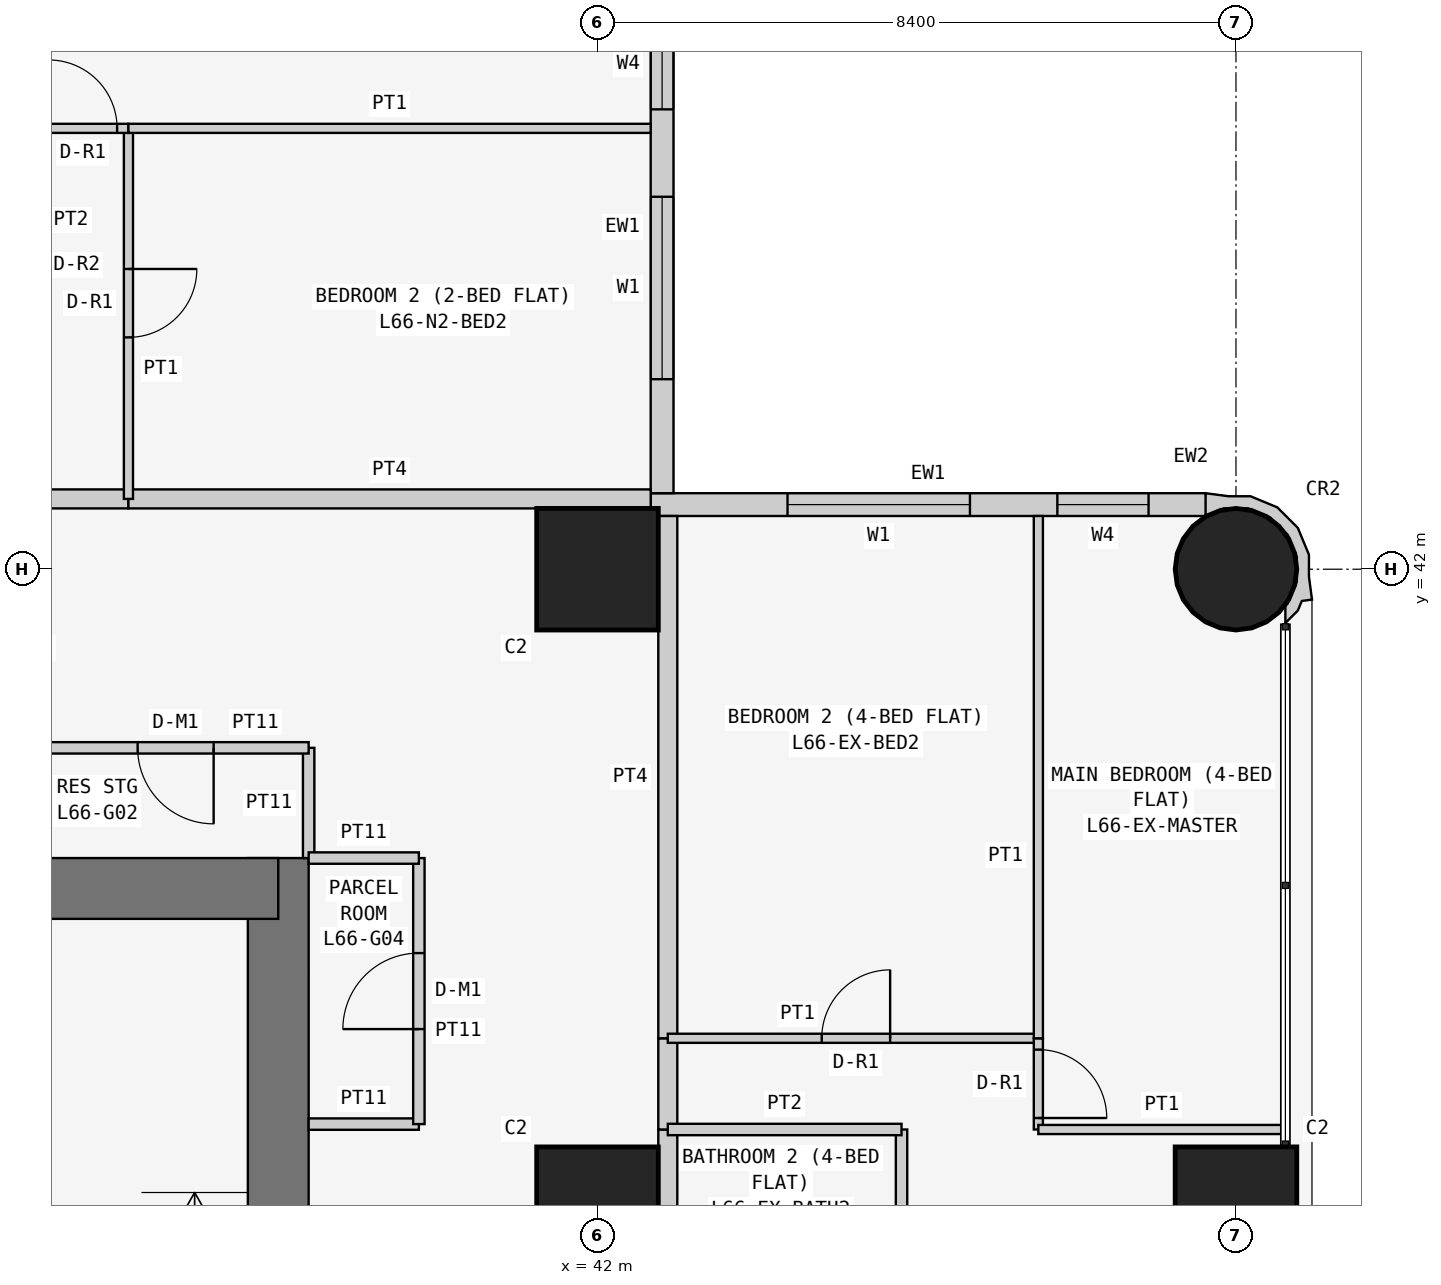
"""IFC4 building model, lengths in metres.
Left out: names, types, materials, properties, quantities, classifications, styles, units other than length and angle.
Written with IfcOpenShell. Run it as: python <this file> out.ifc"""

import sys

from ifc_helpers import new_model, si_unit, direction, frame, frame_2d, origin, origin_2d, place, context, subcontext, project, spatial, polyline, rectangle, circle, outline, extrude, element, fill, save


model = new_model("IFC4")
c1 = context("Model", 3, precision=1e-05, world=origin(), true_north=direction((0.0, 1.0)))
c2 = subcontext(c1, "Body", "Model", "MODEL_VIEW")
j1 = project(units=[si_unit("LENGTHUNIT", "METRE"), si_unit("PLANEANGLEUNIT", "RADIAN")], contexts=[c1])
p1 = place(None, origin())
s1 = spatial("IfcSite", under=j1, at=p1, CompositionType="ELEMENT")
p2 = place(p1, origin())
s2 = spatial("IfcBuilding", under=s1, at=p2, CompositionType="ELEMENT")
p3 = place(p2, frame((0.0, 0.0, 254.1)))
s3 = spatial("IfcBuildingStorey", under=s2, at=p3, CompositionType="ELEMENT", Elevation=254.1)
for number, where, z_axis, x_axis in (
    (1, (42.0, 33.6, 0.0), (0.0, 0.0, 1.0), (1.0, 0.0, 0.0)),
    (2, (42.0, 42.0, 0.0), (0.0, 0.0, 1.0), (1.0, 0.0, 0.0)),
    (3, (50.4, 33.6, 0.0), (0.0, 0.0, 1.0), (1.0, 0.0, 0.0)),
):
    element("IfcColumn", number, at=place(p3, frame(where, z_axis=z_axis, x_axis=x_axis)), inside=s3, PredefinedType="COLUMN", context=c2, shape_type="SweptSolid", body=[
        extrude(rectangle(XDim=1.6, YDim=1.6, at=origin_2d()), origin(), (0.0, 0.0, 1.0), 3.6),
    ])
p4 = place(p3, frame((50.4, 42.0, 0.0), z_axis=(0.0, 0.0, 1.0), x_axis=(1.0, 0.0, 0.0)))
e4 = element("IfcColumn", 4, at=p4, inside=s3, PredefinedType="COLUMN", context=c2, shape_type="SweptSolid", body=[
    extrude(circle(Radius=0.8, at=origin_2d()), origin(), (0.0, 0.0, 1.0), 3.6),
])
p5 = place(p3, frame((37.8, 21.0, 0.0), z_axis=(0.0, 0.0, 1.0), x_axis=(0.0, 1.0, 0.0)))
e5 = element("IfcWall", 5, at=p5, inside=s3, PredefinedType="SHEAR", context=c2, shape_type="SweptSolid", body=[
    extrude(rectangle(XDim=17.2, YDim=0.8, at=frame_2d((8.6, 0.0))), origin(), (0.0, 0.0, 1.0), 3.6),
])
p6 = place(p5, frame((5.2, 0.0, 0.0)))
e6 = element("IfcOpeningElement", 6, at=p6, cuts=e5, PredefinedType="OPENING", context=c2, shape_type="SweptSolid", body=[
    extrude(rectangle(XDim=1.2, YDim=2.1, at=frame_2d((0.6, 1.05))), frame((0.0, 0.41, 0.0), z_axis=(0.0, -1.0, 0.0), x_axis=(1.0, 0.0, 0.0)), (0.0, 0.0, 1.0), 0.82),
])
p7 = place(p3, frame((37.8, 37.8, 0.0), z_axis=(0.0, 0.0, 1.0), x_axis=(-1.0, 0.0, 0.0)))
e7 = element("IfcWall", 7, at=p7, inside=s3, PredefinedType="SHEAR", context=c2, shape_type="SweptSolid", body=[
    extrude(rectangle(XDim=17.2, YDim=0.8, at=frame_2d((8.6, 0.0))), origin(), (0.0, 0.0, 1.0), 3.6),
])
p8 = place(p3, frame((50.0, 42.85, 0.0), z_axis=(0.0, 0.0, 1.0), x_axis=(-1.0, 0.0, 0.0)))
e8 = element("IfcWall", 8, at=p8, inside=s3, PredefinedType="SOLIDWALL", context=c2, shape_type="SweptSolid", body=[
    extrude(rectangle(XDim=7.3, YDim=0.3, at=frame_2d((3.65, 0.0))), origin(), (0.0, 0.0, 1.0), 3.45),
])
p9 = place(p8, frame((3.1, 0.0, 0.9)))
e9 = element("IfcOpeningElement", 9, at=p9, cuts=e8, PredefinedType="OPENING", context=c2, shape_type="SweptSolid", body=[
    extrude(rectangle(XDim=2.4, YDim=1.5, at=frame_2d((1.2, 0.75))), frame((0.0, 0.16, 0.0), z_axis=(0.0, -1.0, 0.0), x_axis=(1.0, 0.0, 0.0)), (0.0, 0.0, 1.0), 0.32),
])
p10 = place(p8, frame((0.75, 0.0, 0.9)))
e10 = element("IfcOpeningElement", 10, at=p10, cuts=e8, PredefinedType="OPENING", context=c2, shape_type="SweptSolid", body=[
    extrude(rectangle(XDim=1.2, YDim=1.5, at=frame_2d((0.6, 0.75))), frame((0.0, 0.16, 0.0), z_axis=(0.0, -1.0, 0.0), x_axis=(1.0, 0.0, 0.0)), (0.0, 0.0, 1.0), 0.32),
])
p11 = place(p3, frame((42.85, 43.0, 0.0), z_axis=(0.0, 0.0, 1.0), x_axis=(0.0, 1.0, 0.0)))
e11 = element("IfcWall", 11, at=p11, inside=s3, PredefinedType="SOLIDWALL", context=c2, shape_type="SweptSolid", body=[
    extrude(rectangle(XDim=7.0, YDim=0.3, at=frame_2d((3.5, 0.0))), origin(), (0.0, 0.0, 1.0), 3.45),
])
p12 = place(p11, frame((1.5, 0.0, 0.9)))
e12 = element("IfcOpeningElement", 12, at=p12, cuts=e11, PredefinedType="OPENING", context=c2, shape_type="SweptSolid", body=[
    extrude(rectangle(XDim=2.4, YDim=1.5, at=frame_2d((1.2, 0.75))), frame((0.0, 0.16, 0.0), z_axis=(0.0, -1.0, 0.0), x_axis=(1.0, 0.0, 0.0)), (0.0, 0.0, 1.0), 0.32),
])
p13 = place(p11, frame((5.05, 0.0, 0.9)))
e13 = element("IfcOpeningElement", 13, at=p13, cuts=e11, PredefinedType="OPENING", context=c2, shape_type="SweptSolid", body=[
    extrude(rectangle(XDim=1.2, YDim=1.5, at=frame_2d((0.6, 0.75))), frame((0.0, 0.16, 0.0), z_axis=(0.0, -1.0, 0.0), x_axis=(1.0, 0.0, 0.0)), (0.0, 0.0, 1.0), 0.32),
])
p14 = place(p3, frame((50.995, 41.352, 0.0), z_axis=(0.0, 0.0, 1.0), x_axis=(0.93923434088, 0.343276641956, 0.0)))
e14 = element("IfcWall", 14, at=p14, inside=s3, PredefinedType="SOLIDWALL", context=c2, shape_type="SweptSolid", body=[
    extrude(outline(polyline([(0.532, 0.393), (0.631, 0.663), (0.614, 1.044), (0.453, 1.391), (0.172, 1.649), (-0.098, 1.748), (-0.369, 1.89), (-0.509, 1.621), (-0.491, 1.615), (-0.479, 1.609), (-0.211, 1.62), (0.088, 1.511), (0.323, 1.295), (0.457, 1.006), (0.47, 0.688), (0.361, 0.389), (0.145, 0.154), (0.108, 0.136), (0.031, -0.075), (0.241, 0.023), (0.333, 0.124), (0.465, 0.094), (0.532, 0.393)])), origin(), (0.0, 0.0, 1.0), 3.45),
])
p15 = place(p3, frame((38.2, 38.2, 0.0), z_axis=(0.0, 0.0, 1.0), x_axis=(0.0, 1.0, 0.0)))
e15 = element("IfcWall", 15, at=p15, inside=s3, PredefinedType="PARTITIONING", context=c2, shape_type="SweptSolid", body=[
    extrude(rectangle(XDim=1.45, YDim=0.15, at=frame_2d((0.725, 0.0))), origin(), (0.0, 0.0, 1.0), 3.45),
])
p16 = place(p3, frame((38.2, 39.65, 0.0), z_axis=(0.0, 0.0, 1.0), x_axis=(-1.0, 0.0, 0.0)))
e16 = element("IfcWall", 16, at=p16, inside=s3, PredefinedType="PARTITIONING", context=c2, shape_type="SweptSolid", body=[
    extrude(rectangle(XDim=3.5, YDim=0.15, at=frame_2d((1.75, 0.0))), origin(), (0.0, 0.0, 1.0), 3.45),
])
p17 = place(p16, frame((1.25, 0.0, 0.0)))
e17 = element("IfcOpeningElement", 17, at=p17, cuts=e16, PredefinedType="OPENING", context=c2, shape_type="SweptSolid", body=[
    extrude(rectangle(XDim=1.0, YDim=2.1, at=frame_2d((0.5, 1.05))), frame((0.0, 0.085, 0.0), z_axis=(0.0, -1.0, 0.0), x_axis=(1.0, 0.0, 0.0)), (0.0, 0.0, 1.0), 0.17),
])
p18 = place(p3, frame((38.2, 34.7, 0.0), z_axis=(0.0, 0.0, 1.0), x_axis=(1.0, 0.0, 0.0)))
e18 = element("IfcWall", 18, at=p18, inside=s3, PredefinedType="PARTITIONING", context=c2, shape_type="SweptSolid", body=[
    extrude(rectangle(XDim=1.45, YDim=0.15, at=frame_2d((0.725, 0.0))), origin(), (0.0, 0.0, 1.0), 3.45),
])
p19 = place(p3, frame((39.65, 34.7, 0.0), z_axis=(0.0, 0.0, 1.0), x_axis=(0.0, 1.0, 0.0)))
e19 = element("IfcWall", 19, at=p19, inside=s3, PredefinedType="PARTITIONING", context=c2, shape_type="SweptSolid", body=[
    extrude(rectangle(XDim=3.5, YDim=0.15, at=frame_2d((1.75, 0.0))), origin(), (0.0, 0.0, 1.0), 3.45),
])
p20 = place(p19, frame((1.25, 0.0, 0.0)))
e20 = element("IfcOpeningElement", 20, at=p20, cuts=e19, PredefinedType="OPENING", context=c2, shape_type="SweptSolid", body=[
    extrude(rectangle(XDim=1.0, YDim=2.1, at=frame_2d((0.5, 1.05))), frame((0.0, 0.085, 0.0), z_axis=(0.0, -1.0, 0.0), x_axis=(1.0, 0.0, 0.0)), (0.0, 0.0, 1.0), 0.17),
])
p21 = place(p3, frame((39.65, 38.2, 0.0), z_axis=(0.0, 0.0, 1.0), x_axis=(-1.0, 0.0, 0.0)))
e21 = element("IfcWall", 21, at=p21, inside=s3, PredefinedType="PARTITIONING", context=c2, shape_type="SweptSolid", body=[
    extrude(rectangle(XDim=1.45, YDim=0.15, at=frame_2d((0.725, 0.0))), origin(), (0.0, 0.0, 1.0), 3.45),
])
p22 = place(p3, frame((29.4, 42.925, 0.0), z_axis=(0.0, 0.0, 1.0), x_axis=(1.0, 0.0, 0.0)))
e22 = element("IfcWall", 22, at=p22, inside=s3, PredefinedType="PARTITIONING", context=c2, shape_type="SweptSolid", body=[
    extrude(rectangle(XDim=6.429, YDim=0.25, at=frame_2d((3.215, 0.0))), origin(), (0.0, 0.0, 1.0), 3.45),
])
p23 = place(p22, frame((0.5, 0.0, 0.0)))
e23 = element("IfcOpeningElement", 23, at=p23, cuts=e22, PredefinedType="OPENING", context=c2, shape_type="SweptSolid", body=[
    extrude(rectangle(XDim=1.0, YDim=2.1, at=frame_2d((0.5, 1.05))), frame((0.0, 0.135, 0.0), z_axis=(0.0, -1.0, 0.0), x_axis=(1.0, 0.0, 0.0)), (0.0, 0.0, 1.0), 0.27),
])
p24 = place(p3, frame((35.829, 42.925, 0.0), z_axis=(0.0, 0.0, 1.0), x_axis=(1.0, 0.0, 0.0)))
e24 = element("IfcWall", 24, at=p24, inside=s3, PredefinedType="PARTITIONING", context=c2, shape_type="SweptSolid", body=[
    extrude(rectangle(XDim=6.871, YDim=0.25, at=frame_2d((3.436, 0.0))), origin(), (0.0, 0.0, 1.0), 3.45),
])
p25 = place(p3, frame((42.925, 34.629, 0.0), z_axis=(0.0, 0.0, 1.0), x_axis=(0.0, -1.0, 0.0)))
e25 = element("IfcWall", 25, at=p25, inside=s3, PredefinedType="PARTITIONING", context=c2, shape_type="SweptSolid", body=[
    extrude(rectangle(XDim=2.629, YDim=0.25, at=frame_2d((1.314, 0.0))), origin(), (0.0, 0.0, 1.0), 3.45),
])
p26 = place(p3, frame((42.925, 35.829, 0.0), z_axis=(0.0, 0.0, 1.0), x_axis=(0.0, -1.0, 0.0)))
e26 = element("IfcWall", 26, at=p26, inside=s3, PredefinedType="PARTITIONING", context=c2, shape_type="SweptSolid", body=[
    extrude(rectangle(XDim=1.2, YDim=0.25, at=frame_2d((0.6, 0.0))), origin(), (0.0, 0.0, 1.0), 3.45),
])
p27 = place(p3, frame((42.925, 42.7, 0.0), z_axis=(0.0, 0.0, 1.0), x_axis=(0.0, -1.0, 0.0)))
e27 = element("IfcWall", 27, at=p27, inside=s3, PredefinedType="PARTITIONING", context=c2, shape_type="SweptSolid", body=[
    extrude(rectangle(XDim=6.871, YDim=0.25, at=frame_2d((3.436, 0.0))), origin(), (0.0, 0.0, 1.0), 3.45),
])
p28 = place(p3, frame((35.829, 47.8, 0.0), z_axis=(0.0, 0.0, 1.0), x_axis=(0.0, -1.0, 0.0)))
e28 = element("IfcWall", 28, at=p28, inside=s3, PredefinedType="PARTITIONING", context=c2, shape_type="SweptSolid", body=[
    extrude(rectangle(XDim=4.875, YDim=0.12, at=frame_2d((2.438, 0.0))), origin(), (0.0, 0.0, 1.0), 3.45),
])
p29 = place(p28, frame((1.85, 0.0, 0.0)))
e29 = element("IfcOpeningElement", 29, at=p29, cuts=e28, PredefinedType="OPENING", context=c2, shape_type="SweptSolid", body=[
    extrude(rectangle(XDim=0.9, YDim=2.1, at=frame_2d((0.45, 1.05))), frame((0.0, 0.07, 0.0), z_axis=(0.0, -1.0, 0.0), x_axis=(1.0, 0.0, 0.0)), (0.0, 0.0, 1.0), 0.14),
])
p30 = place(p3, frame((34.629, 47.8, 0.0), z_axis=(0.0, 0.0, 1.0), x_axis=(1.0, 0.0, 0.0)))
e30 = element("IfcWall", 30, at=p30, inside=s3, PredefinedType="PARTITIONING", context=c2, shape_type="SweptSolid", body=[
    extrude(rectangle(XDim=1.2, YDim=0.12, at=frame_2d((0.6, 0.0))), origin(), (0.0, 0.0, 1.0), 3.45),
])
p31 = place(p30, frame((0.151, 0.0, 0.0)))
e31 = element("IfcOpeningElement", 31, at=p31, cuts=e30, PredefinedType="OPENING", context=c2, shape_type="SweptSolid", body=[
    extrude(rectangle(XDim=0.9, YDim=2.1, at=frame_2d((0.45, 1.05))), frame((0.0, 0.07, 0.0), z_axis=(0.0, -1.0, 0.0), x_axis=(1.0, 0.0, 0.0)), (0.0, 0.0, 1.0), 0.14),
])
p32 = place(p3, frame((35.829, 47.8, 0.0), z_axis=(0.0, 0.0, 1.0), x_axis=(1.0, 0.0, 0.0)))
e32 = element("IfcWall", 32, at=p32, inside=s3, PredefinedType="PARTITIONING", context=c2, shape_type="SweptSolid", body=[
    extrude(rectangle(XDim=6.871, YDim=0.12, at=frame_2d((3.436, 0.0))), origin(), (0.0, 0.0, 1.0), 3.45),
])
p33 = place(p3, frame((46.0, 32.0, 0.0), z_axis=(0.0, 0.0, 1.0), x_axis=(0.0, 1.0, 0.0)))
e33 = element("IfcWall", 33, at=p33, inside=s3, PredefinedType="PARTITIONING", context=c2, shape_type="SweptSolid", body=[
    extrude(rectangle(XDim=2.629, YDim=0.15, at=frame_2d((1.314, 0.0))), origin(), (0.0, 0.0, 1.0), 3.45),
])
p34 = place(p3, frame((46.0, 34.629, 0.0), z_axis=(0.0, 0.0, 1.0), x_axis=(-1.0, 0.0, 0.0)))
e34 = element("IfcWall", 34, at=p34, inside=s3, PredefinedType="PARTITIONING", context=c2, shape_type="SweptSolid", body=[
    extrude(rectangle(XDim=3.075, YDim=0.15, at=frame_2d((1.538, 0.0))), origin(), (0.0, 0.0, 1.0), 3.45),
])
p35 = place(p3, frame((42.925, 35.829, 0.0), z_axis=(0.0, 0.0, 1.0), x_axis=(1.0, 0.0, 0.0)))
e35 = element("IfcWall", 35, at=p35, inside=s3, PredefinedType="PARTITIONING", context=c2, shape_type="SweptSolid", body=[
    extrude(rectangle(XDim=4.875, YDim=0.12, at=frame_2d((2.438, 0.0))), origin(), (0.0, 0.0, 1.0), 3.45),
])
p36 = place(p35, frame((2.025, 0.0, 0.0)))
e36 = element("IfcOpeningElement", 36, at=p36, cuts=e35, PredefinedType="OPENING", context=c2, shape_type="SweptSolid", body=[
    extrude(rectangle(XDim=0.9, YDim=2.1, at=frame_2d((0.45, 1.05))), frame((0.0, 0.07, 0.0), z_axis=(0.0, -1.0, 0.0), x_axis=(1.0, 0.0, 0.0)), (0.0, 0.0, 1.0), 0.14),
])
p37 = place(p3, frame((47.8, 35.829, 0.0), z_axis=(0.0, 0.0, 1.0), x_axis=(0.0, -1.0, 0.0)))
e37 = element("IfcWall", 37, at=p37, inside=s3, PredefinedType="PARTITIONING", context=c2, shape_type="SweptSolid", body=[
    extrude(rectangle(XDim=1.2, YDim=0.12, at=frame_2d((0.6, 0.0))), origin(), (0.0, 0.0, 1.0), 3.45),
])
p38 = place(p37, frame((0.149, 0.0, 0.0)))
e38 = element("IfcOpeningElement", 38, at=p38, cuts=e37, PredefinedType="OPENING", context=c2, shape_type="SweptSolid", body=[
    extrude(rectangle(XDim=0.9, YDim=2.1, at=frame_2d((0.45, 1.05))), frame((0.0, 0.07, 0.0), z_axis=(0.0, -1.0, 0.0), x_axis=(1.0, 0.0, 0.0)), (0.0, 0.0, 1.0), 0.14),
])
p39 = place(p3, frame((47.8, 34.629, 0.0), z_axis=(0.0, 0.0, 1.0), x_axis=(1.0, 0.0, 0.0)))
e39 = element("IfcWall", 39, at=p39, inside=s3, PredefinedType="PARTITIONING", context=c2, shape_type="SweptSolid", body=[
    extrude(rectangle(XDim=3.25, YDim=0.12, at=frame_2d((1.625, 0.0))), origin(), (0.0, 0.0, 1.0), 3.45),
])
p40 = place(p3, frame((47.8, 35.829, 0.0), z_axis=(0.0, 0.0, 1.0), x_axis=(0.0, 1.0, 0.0)))
e40 = element("IfcWall", 40, at=p40, inside=s3, PredefinedType="PARTITIONING", context=c2, shape_type="SweptSolid", body=[
    extrude(rectangle(XDim=6.871, YDim=0.12, at=frame_2d((3.436, 0.0))), origin(), (0.0, 0.0, 1.0), 3.45),
])
p41 = place(p12, origin())
e41 = element("IfcWindow", 41, at=p41, inside=s3, PartitioningType="SINGLE_PANEL", PredefinedType="WINDOW", context=c2, shape_type="SweptSolid", body=[
    extrude(rectangle(XDim=2.4, YDim=1.5, at=frame_2d((1.2, 0.75))), frame((0.0, 0.03, 0.0), z_axis=(0.0, -1.0, 0.0), x_axis=(1.0, 0.0, 0.0)), (0.0, 0.0, 1.0), 0.06),
])
fill(e12, e41)
p42 = place(p13, origin())
e42 = element("IfcWindow", 42, at=p42, inside=s3, PartitioningType="SINGLE_PANEL", PredefinedType="WINDOW", context=c2, shape_type="SweptSolid", body=[
    extrude(rectangle(XDim=1.2, YDim=1.5, at=frame_2d((0.6, 0.75))), frame((0.0, 0.03, 0.0), z_axis=(0.0, -1.0, 0.0), x_axis=(1.0, 0.0, 0.0)), (0.0, 0.0, 1.0), 0.06),
])
fill(e13, e42)
p43 = place(p9, origin())
e43 = element("IfcWindow", 43, at=p43, inside=s3, PartitioningType="SINGLE_PANEL", PredefinedType="WINDOW", context=c2, shape_type="SweptSolid", body=[
    extrude(rectangle(XDim=2.4, YDim=1.5, at=frame_2d((1.2, 0.75))), frame((0.0, 0.03, 0.0), z_axis=(0.0, -1.0, 0.0), x_axis=(1.0, 0.0, 0.0)), (0.0, 0.0, 1.0), 0.06),
])
fill(e9, e43)
p44 = place(p10, origin())
e44 = element("IfcWindow", 44, at=p44, inside=s3, PartitioningType="SINGLE_PANEL", PredefinedType="WINDOW", context=c2, shape_type="SweptSolid", body=[
    extrude(rectangle(XDim=1.2, YDim=1.5, at=frame_2d((0.6, 0.75))), frame((0.0, 0.03, 0.0), z_axis=(0.0, -1.0, 0.0), x_axis=(1.0, 0.0, 0.0)), (0.0, 0.0, 1.0), 0.06),
])
fill(e10, e44)
p45 = place(p17, origin())
e45 = element("IfcDoor", 45, at=p45, inside=s3, OperationType="SINGLE_SWING_LEFT", PredefinedType="DOOR", context=c2, shape_type="SweptSolid", body=[
    extrude(rectangle(XDim=1.0, YDim=2.1, at=frame_2d((0.5, 1.05))), frame((0.0, 0.025, 0.0), z_axis=(0.0, -1.0, 0.0), x_axis=(1.0, 0.0, 0.0)), (0.0, 0.0, 1.0), 0.05),
])
fill(e17, e45)
p46 = place(p20, origin())
e46 = element("IfcDoor", 46, at=p46, inside=s3, OperationType="SINGLE_SWING_LEFT", PredefinedType="DOOR", context=c2, shape_type="SweptSolid", body=[
    extrude(rectangle(XDim=1.0, YDim=2.1, at=frame_2d((0.5, 1.05))), frame((0.0, 0.025, 0.0), z_axis=(0.0, -1.0, 0.0), x_axis=(1.0, 0.0, 0.0)), (0.0, 0.0, 1.0), 0.05),
])
fill(e20, e46)
p47 = place(p29, origin())
e47 = element("IfcDoor", 47, at=p47, inside=s3, OperationType="SINGLE_SWING_LEFT", PredefinedType="DOOR", context=c2, shape_type="SweptSolid", body=[
    extrude(rectangle(XDim=0.9, YDim=2.1, at=frame_2d((0.45, 1.05))), frame((0.0, 0.025, 0.0), z_axis=(0.0, -1.0, 0.0), x_axis=(1.0, 0.0, 0.0)), (0.0, 0.0, 1.0), 0.05),
])
fill(e29, e47)
p48 = place(p31, origin())
e48 = element("IfcDoor", 48, at=p48, inside=s3, OperationType="SINGLE_SWING_LEFT", PredefinedType="DOOR", context=c2, shape_type="SweptSolid", body=[
    extrude(rectangle(XDim=0.9, YDim=2.1, at=frame_2d((0.45, 1.05))), frame((0.0, 0.025, 0.0), z_axis=(0.0, -1.0, 0.0), x_axis=(1.0, 0.0, 0.0)), (0.0, 0.0, 1.0), 0.05),
])
fill(e31, e48)
p49 = place(p36, origin())
e49 = element("IfcDoor", 49, at=p49, inside=s3, OperationType="SINGLE_SWING_RIGHT", PredefinedType="DOOR", context=c2, shape_type="SweptSolid", body=[
    extrude(rectangle(XDim=0.9, YDim=2.1, at=frame_2d((0.45, 1.05))), frame((0.0, 0.025, 0.0), z_axis=(0.0, -1.0, 0.0), x_axis=(1.0, 0.0, 0.0)), (0.0, 0.0, 1.0), 0.05),
])
fill(e36, e49)
p50 = place(p38, origin())
e50 = element("IfcDoor", 50, at=p50, inside=s3, OperationType="SINGLE_SWING_RIGHT", PredefinedType="DOOR", context=c2, shape_type="SweptSolid", body=[
    extrude(rectangle(XDim=0.9, YDim=2.1, at=frame_2d((0.45, 1.05))), frame((0.0, 0.025, 0.0), z_axis=(0.0, -1.0, 0.0), x_axis=(1.0, 0.0, 0.0)), (0.0, 0.0, 1.0), 0.05),
])
fill(e38, e50)
save(model, sys.argv[1])
